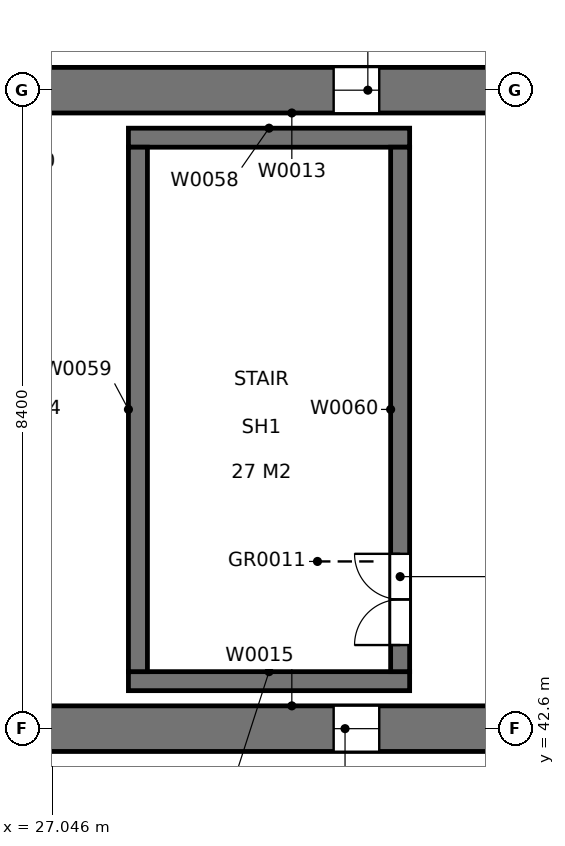
"""IFC4 building model, lengths in metres.
Left out: names, types, materials, properties, quantities, classifications, styles, units other than length and angle.
Written with IfcOpenShell. Run it as: python <this file> out.ifc"""

import sys

from ifc_helpers import new_model, si_unit, direction, frame, frame_2d, origin, place, context, subcontext, project, spatial, rectangle, extrude, element, fill, save


model = new_model("IFC4")
c1 = context("Model", 3, precision=1e-05, world=origin(), true_north=direction((0.0, 1.0)))
c2 = subcontext(c1, "Body", "Model", "MODEL_VIEW")
j1 = project(units=[si_unit("LENGTHUNIT", "METRE"), si_unit("PLANEANGLEUNIT", "RADIAN")], contexts=[c1])
p1 = place(None, origin())
s1 = spatial("IfcSite", under=j1, at=p1, CompositionType="ELEMENT")
p2 = place(p1, origin())
s2 = spatial("IfcBuilding", under=s1, at=p2, CompositionType="ELEMENT")
p3 = place(p2, frame((0.0, 0.0, 24.0)))
s3 = spatial("IfcBuildingStorey", under=s2, at=p3, CompositionType="ELEMENT", Elevation=24.0)
p4 = place(p3, frame((33.9, 51.0, 0.0), z_axis=(0.0, 0.0, 1.0), x_axis=(-1.0, 0.0, 0.0)))
e1 = element("IfcWall", 1, at=p4, inside=s3, PredefinedType="SOLIDWALL", context=c2, shape_type="SweptSolid", body=[
    extrude(rectangle(XDim=7.4, YDim=0.6, at=frame_2d((3.7, 0.0))), origin(), (0.0, 0.0, 1.0), 4.8),
])
p5 = place(p4, frame((2.55, 0.0, 1.5)))
e2 = element("IfcOpeningElement", 2, at=p5, cuts=e1, PredefinedType="OPENING", context=c2, shape_type="SweptSolid", body=[
    extrude(rectangle(XDim=0.6, YDim=1.8, at=frame_2d((0.3, 0.9))), frame((0.0, 0.31, 0.0), z_axis=(0.0, -1.0, 0.0), x_axis=(1.0, 0.0, 0.0)), (0.0, 0.0, 1.0), 0.62),
])
p6 = place(p3, frame((26.5, 42.6, 0.0), z_axis=(0.0, 0.0, 1.0), x_axis=(1.0, 0.0, 0.0)))
e3 = element("IfcWall", 3, at=p6, inside=s3, PredefinedType="SOLIDWALL", context=c2, shape_type="SweptSolid", body=[
    extrude(rectangle(XDim=7.4, YDim=0.6, at=frame_2d((3.7, 0.0))), origin(), (0.0, 0.0, 1.0), 4.8),
])
p7 = place(p6, frame((4.25, 0.0, 1.5)))
e4 = element("IfcOpeningElement", 4, at=p7, cuts=e3, PredefinedType="OPENING", context=c2, shape_type="SweptSolid", body=[
    extrude(rectangle(XDim=0.6, YDim=1.8, at=frame_2d((0.3, 0.9))), frame((0.0, 0.31, 0.0), z_axis=(0.0, -1.0, 0.0), x_axis=(1.0, 0.0, 0.0)), (0.0, 0.0, 1.0), 0.62),
])
for number, where, z_axis, x_axis in (
    (5, (28.05, 43.225, 0.0), (0.0, 0.0, 1.0), (1.0, 0.0, 0.0)),
    (6, (28.05, 50.375, 0.0), (0.0, 0.0, 1.0), (1.0, 0.0, 0.0)),
):
    element("IfcWall", number, at=place(p3, frame(where, z_axis=z_axis, x_axis=x_axis)), inside=s3, PredefinedType="SOLIDWALL", context=c2, shape_type="SweptSolid", body=[
        extrude(rectangle(XDim=3.7, YDim=0.25, at=frame_2d((1.85, 0.0))), origin(), (0.0, 0.0, 1.0), 4.8),
    ])
p8 = place(p3, frame((28.175, 43.35, 0.0), z_axis=(0.0, 0.0, 1.0), x_axis=(0.0, 1.0, 0.0)))
e7 = element("IfcWall", 7, at=p8, inside=s3, PredefinedType="SOLIDWALL", context=c2, shape_type="SweptSolid", body=[
    extrude(rectangle(XDim=6.9, YDim=0.25, at=frame_2d((3.45, 0.0))), origin(), (0.0, 0.0, 1.0), 4.8),
])
p9 = place(p3, frame((31.625, 43.35, 0.0), z_axis=(0.0, 0.0, 1.0), x_axis=(0.0, 1.0, 0.0)))
e8 = element("IfcWall", 8, at=p9, inside=s3, PredefinedType="SOLIDWALL", context=c2, shape_type="SweptSolid", body=[
    extrude(rectangle(XDim=6.9, YDim=0.25, at=frame_2d((3.45, 0.0))), origin(), (0.0, 0.0, 1.0), 4.8),
])
p10 = place(p9, frame((0.35, 0.0, 0.0)))
e9 = element("IfcOpeningElement", 9, at=p10, cuts=e8, PredefinedType="OPENING", context=c2, shape_type="SweptSolid", body=[
    extrude(rectangle(XDim=1.2, YDim=2.1, at=frame_2d((0.6, 1.05))), frame((0.0, 0.135, 0.0), z_axis=(0.0, -1.0, 0.0), x_axis=(1.0, 0.0, 0.0)), (0.0, 0.0, 1.0), 0.27),
])
p11 = place(p10, origin())
e10 = element("IfcDoor", 10, at=p11, inside=s3, OperationType="DOUBLE_DOOR_SINGLE_SWING", PredefinedType="DOOR", context=c2, shape_type="SweptSolid", body=[
    extrude(rectangle(XDim=1.2, YDim=2.1, at=frame_2d((0.6, 1.05))), frame((0.0, 0.025, 0.0), z_axis=(0.0, -1.0, 0.0), x_axis=(1.0, 0.0, 0.0)), (0.0, 0.0, 1.0), 0.05),
])
fill(e9, e10)
p12 = place(p5, origin())
e11 = element("IfcWindow", 11, at=p12, inside=s3, PartitioningType="SINGLE_PANEL", PredefinedType="WINDOW", context=c2, shape_type="SweptSolid", body=[
    extrude(rectangle(XDim=0.6, YDim=1.8, at=frame_2d((0.3, 0.9))), frame((0.0, 0.01, 0.0), z_axis=(0.0, -1.0, 0.0), x_axis=(1.0, 0.0, 0.0)), (0.0, 0.0, 1.0), 0.06),
])
fill(e2, e11)
p13 = place(p7, origin())
e12 = element("IfcWindow", 12, at=p13, inside=s3, PartitioningType="SINGLE_PANEL", PredefinedType="WINDOW", context=c2, shape_type="SweptSolid", body=[
    extrude(rectangle(XDim=0.6, YDim=1.8, at=frame_2d((0.3, 0.9))), frame((0.0, 0.01, 0.0), z_axis=(0.0, -1.0, 0.0), x_axis=(1.0, 0.0, 0.0)), (0.0, 0.0, 1.0), 0.06),
])
fill(e4, e12)
save(model, sys.argv[1])
